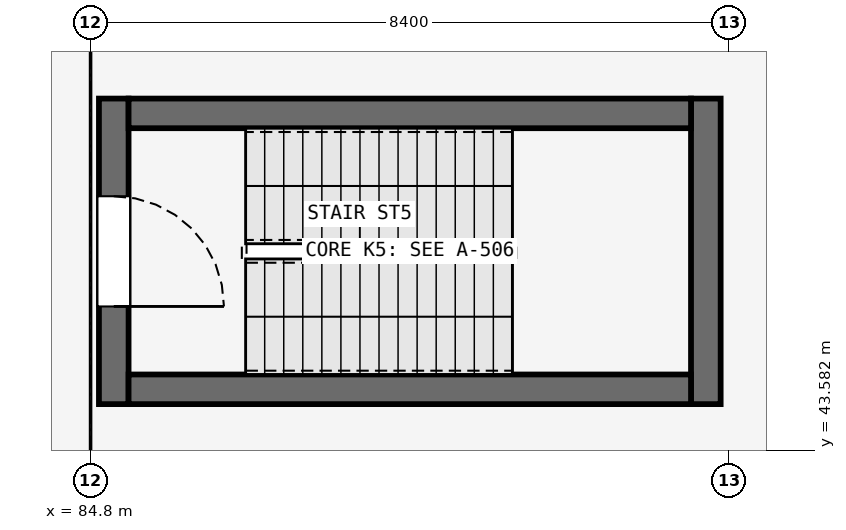
"""IFC4 building model, lengths in metres.
Left out: names, types, materials, properties, quantities, classifications, styles, units other than length and angle.
Written with IfcOpenShell. Run it as: python <this file> out.ifc"""

import sys

from ifc_helpers import new_model, si_unit, direction, frame, frame_2d, origin, place, context, subcontext, project, spatial, rectangle, extrude, element, fill, save


model = new_model("IFC4")
c1 = context("Model", 3, precision=1e-05, world=origin(), true_north=direction((0.0, 1.0)))
c2 = subcontext(c1, "Body", "Model", "MODEL_VIEW")
j1 = project(units=[si_unit("LENGTHUNIT", "METRE"), si_unit("PLANEANGLEUNIT", "RADIAN")], contexts=[c1])
p1 = place(None, origin())
s1 = spatial("IfcSite", under=j1, at=p1, CompositionType="ELEMENT")
p2 = place(p1, origin())
s2 = spatial("IfcBuilding", under=s1, at=p2, CompositionType="ELEMENT")
p3 = place(p2, frame((0.0, 0.0, 5.4)))
s3 = spatial("IfcBuildingStorey", under=s2, at=p3, CompositionType="ELEMENT", Elevation=5.4)
p4 = place(p3, frame((85.105, 48.21, 0.0), z_axis=(0.0, 0.0, 1.0), x_axis=(0.0, -1.0, 0.0)))
e1 = element("IfcWall", 1, at=p4, inside=s3, PredefinedType="SHEAR", context=c2, shape_type="SweptSolid", body=[
    extrude(rectangle(XDim=4.02, YDim=0.39, at=frame_2d((2.01, 0.0))), origin(), (0.0, 0.0, 1.0), 4.2),
])
p5 = place(p4, frame((1.285, 0.0, 0.0)))
e2 = element("IfcOpeningElement", 2, at=p5, cuts=e1, PredefinedType="OPENING", context=c2, shape_type="SweptSolid", body=[
    extrude(rectangle(XDim=1.45, YDim=2.2, at=frame_2d((0.725, 1.1))), frame((0.0, 0.205, 0.0), z_axis=(0.0, -1.0, 0.0), x_axis=(1.0, 0.0, 0.0)), (0.0, 0.0, 1.0), 0.41),
])
p6 = place(p3, frame((92.895, 44.19, 0.0), z_axis=(0.0, 0.0, 1.0), x_axis=(0.0, 1.0, 0.0)))
e3 = element("IfcWall", 3, at=p6, inside=s3, PredefinedType="SHEAR", context=c2, shape_type="SweptSolid", body=[
    extrude(rectangle(XDim=4.02, YDim=0.39, at=frame_2d((2.01, 0.0))), origin(), (0.0, 0.0, 1.0), 4.2),
])
for number, where, z_axis, x_axis in (
    (4, (85.3, 44.385, 0.0), (0.0, 0.0, 1.0), (1.0, 0.0, 0.0)),
    (5, (85.3, 48.015, 0.0), (0.0, 0.0, 1.0), (1.0, 0.0, 0.0)),
):
    element("IfcWall", number, at=place(p3, frame(where, z_axis=z_axis, x_axis=x_axis)), inside=s3, PredefinedType="SHEAR", context=c2, shape_type="SweptSolid", body=[
        extrude(rectangle(XDim=7.4, YDim=0.39, at=frame_2d((3.7, 0.0))), origin(), (0.0, 0.0, 1.0), 4.2),
    ])
p7 = place(p5, origin())
e6 = element("IfcDoor", 6, at=p7, inside=s3, OperationType="SINGLE_SWING_RIGHT", PredefinedType="DOOR", context=c2, shape_type="SweptSolid", body=[
    extrude(rectangle(XDim=1.45, YDim=2.2, at=frame_2d((0.725, 1.1))), frame((0.0, 0.025, 0.0), z_axis=(0.0, -1.0, 0.0), x_axis=(1.0, 0.0, 0.0)), (0.0, 0.0, 1.0), 0.05),
])
fill(e2, e6)
save(model, sys.argv[1])
